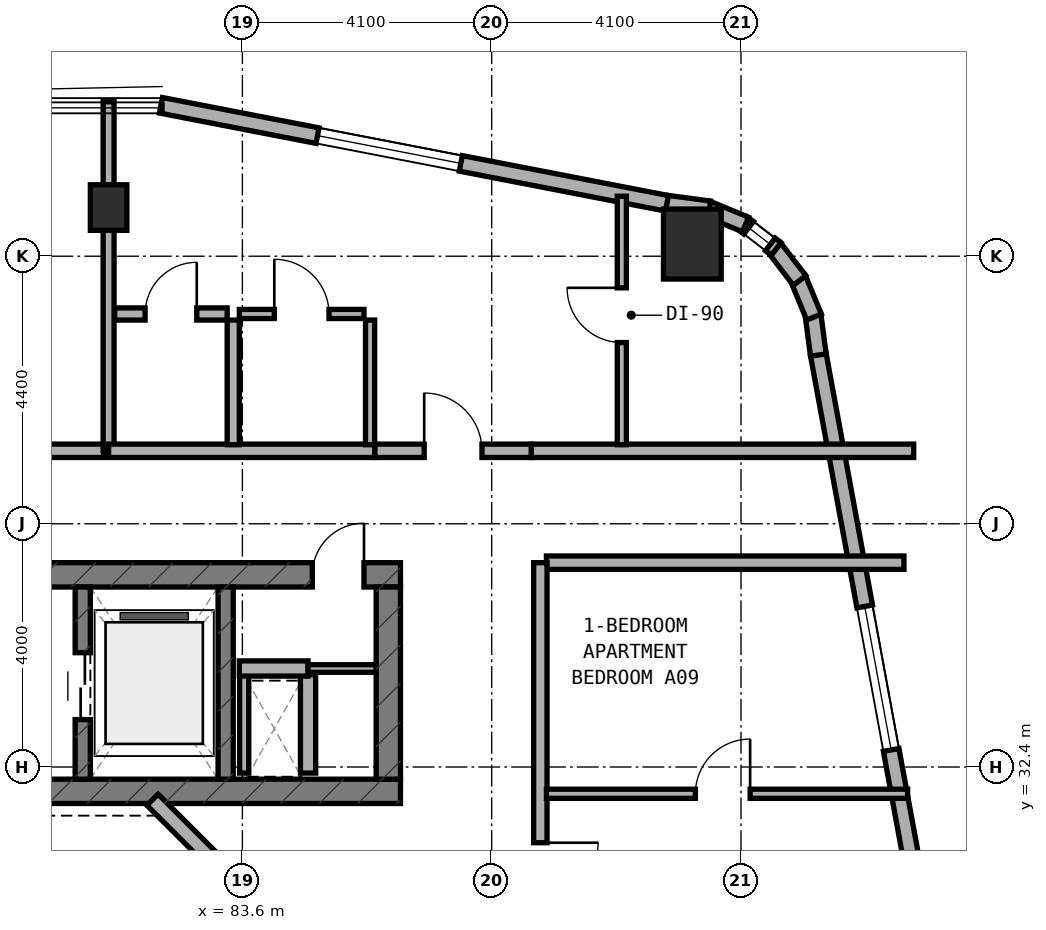
"""IFC4 building model, lengths in metres.
Left out: names, types, materials, properties, quantities, classifications, styles, units other than length and angle.
Written with IfcOpenShell. Run it as: python <this file> out.ifc"""

import sys

from ifc_helpers import new_model, si_unit, direction, frame, frame_2d, origin, origin_2d, place, context, subcontext, project, spatial, rectangle, extrude, element, fill, save


model = new_model("IFC4")
c1 = context("Model", 3, precision=1e-05, world=origin(), true_north=direction((0.0, 1.0)))
c2 = subcontext(c1, "Body", "Model", "MODEL_VIEW")
j1 = project(units=[si_unit("LENGTHUNIT", "METRE"), si_unit("PLANEANGLEUNIT", "RADIAN")], contexts=[c1])
p1 = place(None, origin())
s1 = spatial("IfcSite", under=j1, at=p1, CompositionType="ELEMENT")
p2 = place(p1, origin())
s2 = spatial("IfcBuilding", under=s1, at=p2, CompositionType="ELEMENT")
p3 = place(p2, frame((0.0, 0.0, 98.5)))
s3 = spatial("IfcBuildingStorey", under=s2, at=p3, CompositionType="ELEMENT", Elevation=98.5)
p4 = place(p3, frame((68.0, 32.0, 0.0), z_axis=(0.0, 0.0, 1.0), x_axis=(1.0, 0.0, 0.0)))
e1 = element("IfcWall", 1, at=p4, inside=s3, PredefinedType="SHEAR", context=c2, shape_type="SweptSolid", body=[
    extrude(rectangle(XDim=18.2, YDim=0.4, at=frame_2d((9.1, 0.0))), origin(), (0.0, 0.0, 1.0), 3.5),
])
p5 = place(p3, frame((68.0, 35.56, 0.0), z_axis=(0.0, 0.0, 1.0), x_axis=(1.0, 0.0, 0.0)))
e2 = element("IfcWall", 2, at=p5, inside=s3, PredefinedType="SHEAR", context=c2, shape_type="SweptSolid", body=[
    extrude(rectangle(XDim=18.2, YDim=0.4, at=frame_2d((9.1, 0.0))), origin(), (0.0, 0.0, 1.0), 3.5),
])
p6 = place(p5, frame((9.15, 0.0, 0.0)))
e3 = element("IfcOpeningElement", 3, at=p6, cuts=e2, PredefinedType="OPENING", context=c2, shape_type="SweptSolid", body=[
    extrude(rectangle(XDim=1.2, YDim=2.15, at=frame_2d((0.6, 1.075))), frame((0.0, 0.21, 0.0), z_axis=(0.0, -1.0, 0.0), x_axis=(1.0, 0.0, 0.0)), (0.0, 0.0, 1.0), 0.42),
])
p7 = place(p5, frame((16.75, 0.0, 0.0)))
e4 = element("IfcOpeningElement", 4, at=p7, cuts=e2, PredefinedType="OPENING", context=c2, shape_type="SweptSolid", body=[
    extrude(rectangle(XDim=0.85, YDim=2.1, at=frame_2d((0.425, 1.05))), frame((0.0, 0.21, 0.0), z_axis=(0.0, -1.0, 0.0), x_axis=(1.0, 0.0, 0.0)), (0.0, 0.0, 1.0), 0.42),
])
p8 = place(p3, frame((86.0, 32.2, 0.0), z_axis=(0.0, 0.0, 1.0), x_axis=(0.0, 1.0, 0.0)))
e5 = element("IfcWall", 5, at=p8, inside=s3, PredefinedType="SHEAR", context=c2, shape_type="SweptSolid", body=[
    extrude(rectangle(XDim=3.16, YDim=0.4, at=frame_2d((1.58, 0.0))), origin(), (0.0, 0.0, 1.0), 3.5),
])
p9 = place(p3, frame((80.975, 32.2, 0.0), z_axis=(0.0, 0.0, 1.0), x_axis=(0.0, 1.0, 0.0)))
e6 = element("IfcWall", 6, at=p9, inside=s3, PredefinedType="STANDARD", context=c2, shape_type="SweptSolid", body=[
    extrude(rectangle(XDim=3.16, YDim=0.25, at=frame_2d((1.58, 0.0))), origin(), (0.0, 0.0, 1.0), 3.25),
])
p10 = place(p9, frame((0.98, 0.0, 0.0)))
e7 = element("IfcOpeningElement", 7, at=p10, cuts=e6, PredefinedType="OPENING", context=c2, shape_type="SweptSolid", body=[
    extrude(rectangle(XDim=1.1, YDim=2.15, at=frame_2d((0.55, 1.075))), frame((0.0, 0.135, 0.0), z_axis=(0.0, -1.0, 0.0), x_axis=(1.0, 0.0, 0.0)), (0.0, 0.0, 1.0), 0.27),
])
p11 = place(p3, frame((83.325, 32.2, 0.0), z_axis=(0.0, 0.0, 1.0), x_axis=(0.0, 1.0, 0.0)))
e8 = element("IfcWall", 8, at=p11, inside=s3, PredefinedType="STANDARD", context=c2, shape_type="SweptSolid", body=[
    extrude(rectangle(XDim=3.16, YDim=0.25, at=frame_2d((1.58, 0.0))), origin(), (0.0, 0.0, 1.0), 3.25),
])
p12 = place(p3, frame((81.4, 41.6, 0.0), z_axis=(0.0, 0.0, 1.0), x_axis=(1.0, 0.0, 0.0)))
e9 = element("IfcColumn", 9, at=p12, inside=s3, PredefinedType="COLUMN", context=c2, shape_type="SweptSolid", body=[
    extrude(rectangle(XDim=0.6, YDim=0.75, at=origin_2d()), origin(), (0.0, 0.0, 1.0), 3.5),
])
p13 = place(p3, frame((91.0, 41.0, 0.0), z_axis=(0.0, 0.0, 1.0), x_axis=(1.0, 0.0, 0.0)))
e10 = element("IfcColumn", 10, at=p13, inside=s3, PredefinedType="COLUMN", context=c2, shape_type="SweptSolid", body=[
    extrude(rectangle(XDim=0.95, YDim=1.15, at=origin_2d()), origin(), (0.0, 0.0, 1.0), 3.5),
])
p14 = place(p3, frame((94.682, 30.442, 0.0), z_axis=(0.0, 0.0, 1.0), x_axis=(-0.181209963057, 0.983444431215, 0.0)))
e11 = element("IfcWall", 11, at=p14, inside=s3, PredefinedType="STANDARD", context=c2, shape_type="SweptSolid", body=[
    extrude(rectangle(XDim=8.889, YDim=0.26, at=frame_2d((4.445, 0.0))), origin(), (0.0, 0.0, 1.0), 3.25),
])
p15 = place(p14, frame((2.276, 0.0, 0.8)))
e12 = element("IfcOpeningElement", 12, at=p15, cuts=e11, PredefinedType="OPENING", context=c2, shape_type="SweptSolid", body=[
    extrude(rectangle(XDim=2.4, YDim=1.6, at=frame_2d((1.2, 0.8))), frame((0.0, 0.14, 0.0), z_axis=(0.0, -1.0, 0.0), x_axis=(1.0, 0.0, 0.0)), (0.0, 0.0, 1.0), 0.28),
])
p16 = place(p3, frame((93.072, 39.175, 0.0), z_axis=(0.0, 0.0, 1.0), x_axis=(-0.131667498923, 0.991293937098, 0.0)))
e13 = element("IfcWall", 13, at=p16, inside=s3, PredefinedType="STANDARD", context=c2, shape_type="SweptSolid", body=[
    extrude(rectangle(XDim=0.677, YDim=0.26, at=frame_2d((0.338, 0.0))), origin(), (0.0, 0.0, 1.0), 3.25),
])
p17 = place(p3, frame((93.001, 39.8, 0.0), z_axis=(0.0, 0.0, 1.0), x_axis=(-0.381988976935, 0.924166879681, 0.0)))
e14 = element("IfcWall", 14, at=p17, inside=s3, PredefinedType="STANDARD", context=c2, shape_type="SweptSolid", body=[
    extrude(rectangle(XDim=0.693, YDim=0.26, at=frame_2d((0.347, 0.0))), origin(), (0.0, 0.0, 1.0), 3.25),
])
p18 = place(p3, frame((92.764, 40.401, 0.0), z_axis=(0.0, 0.0, 1.0), x_axis=(-0.609472651958, 0.792807092876, 0.0)))
e15 = element("IfcWall", 15, at=p18, inside=s3, PredefinedType="STANDARD", context=c2, shape_type="SweptSolid", body=[
    extrude(rectangle(XDim=0.694, YDim=0.26, at=frame_2d((0.347, 0.0))), origin(), (0.0, 0.0, 1.0), 3.25),
])
p19 = place(p3, frame((92.379, 40.92, 0.0), z_axis=(0.0, 0.0, 1.0), x_axis=(-0.792506234191, 0.609863811657, 0.0)))
e16 = element("IfcWall", 16, at=p19, inside=s3, PredefinedType="STANDARD", context=c2, shape_type="SweptSolid", body=[
    extrude(rectangle(XDim=0.694, YDim=0.26, at=frame_2d((0.347, 0.0))), origin(), (0.0, 0.0, 1.0), 3.25),
])
p20 = place(p19, frame((0.122, 0.0, 0.85)))
e17 = element("IfcOpeningElement", 17, at=p20, cuts=e16, PredefinedType="OPENING", context=c2, shape_type="SweptSolid", body=[
    extrude(rectangle(XDim=0.45, YDim=1.5, at=frame_2d((0.225, 0.75))), frame((0.0, 0.14, 0.0), z_axis=(0.0, -1.0, 0.0), x_axis=(1.0, 0.0, 0.0)), (0.0, 0.0, 1.0), 0.28),
])
p21 = place(p3, frame((91.873, 41.322, 0.0), z_axis=(0.0, 0.0, 1.0), x_axis=(-0.92421822618, 0.381864727877, 0.0)))
e18 = element("IfcWall", 18, at=p21, inside=s3, PredefinedType="STANDARD", context=c2, shape_type="SweptSolid", body=[
    extrude(rectangle(XDim=0.694, YDim=0.26, at=frame_2d((0.347, 0.0))), origin(), (0.0, 0.0, 1.0), 3.25),
])
p22 = place(p3, frame((91.281, 41.579, 0.0), z_axis=(0.0, 0.0, 1.0), x_axis=(-0.991433279471, 0.130614135366, 0.0)))
e19 = element("IfcWall", 19, at=p22, inside=s3, PredefinedType="STANDARD", context=c2, shape_type="SweptSolid", body=[
    extrude(rectangle(XDim=0.712, YDim=0.26, at=frame_2d((0.356, 0.0))), origin(), (0.0, 0.0, 1.0), 3.25),
])
p23 = place(p3, frame((90.583, 41.67, 0.0), z_axis=(0.0, 0.0, 1.0), x_axis=(-0.981750199588, 0.190175039396, 0.0)))
e20 = element("IfcWall", 20, at=p23, inside=s3, PredefinedType="STANDARD", context=c2, shape_type="SweptSolid", body=[
    extrude(rectangle(XDim=8.477, YDim=0.26, at=frame_2d((4.238, 0.0))), origin(), (0.0, 0.0, 1.0), 3.25),
])
p24 = place(p23, frame((3.454, 0.0, 0.8)))
e21 = element("IfcOpeningElement", 21, at=p24, cuts=e20, PredefinedType="OPENING", context=c2, shape_type="SweptSolid", body=[
    extrude(rectangle(XDim=2.4, YDim=1.6, at=frame_2d((1.2, 0.8))), frame((0.0, 0.14, 0.0), z_axis=(0.0, -1.0, 0.0), x_axis=(1.0, 0.0, 0.0)), (0.0, 0.0, 1.0), 0.28),
])
p25 = place(p3, frame((83.756, 30.228, 0.0), z_axis=(0.0, 0.0, 1.0), x_axis=(-0.707106781187, 0.707106781187, 0.0)))
e22 = element("IfcWall", 22, at=p25, inside=s3, PredefinedType="STANDARD", context=c2, shape_type="SweptSolid", body=[
    extrude(rectangle(XDim=2.311, YDim=0.26, at=frame_2d((1.155, 0.0))), origin(), (0.0, 0.0, 1.0), 3.25),
])
p26 = place(p3, frame((83.63, 32.3, 0.0), z_axis=(0.0, 0.0, 1.0), x_axis=(0.0, 1.0, 0.0)))
e23 = element("IfcWall", 23, at=p26, inside=s3, PredefinedType="PARTITIONING", context=c2, shape_type="SweptSolid", body=[
    extrude(rectangle(XDim=1.62, YDim=0.15, at=frame_2d((0.81, 0.0))), origin(), (0.0, 0.0, 1.0), 2.825),
])
p27 = place(p3, frame((84.68, 32.3, 0.0), z_axis=(0.0, 0.0, 1.0), x_axis=(0.0, 1.0, 0.0)))
e24 = element("IfcWall", 24, at=p27, inside=s3, PredefinedType="SOLIDWALL", context=c2, shape_type="SweptSolid", body=[
    extrude(rectangle(XDim=1.62, YDim=0.25, at=frame_2d((0.81, 0.0))), origin(), (0.0, 0.0, 1.0), 3.22),
])
p28 = place(p3, frame((83.55, 34.02, 0.0), z_axis=(0.0, 0.0, 1.0), x_axis=(1.0, 0.0, 0.0)))
e25 = element("IfcWall", 25, at=p28, inside=s3, PredefinedType="SOLIDWALL", context=c2, shape_type="SweptSolid", body=[
    extrude(rectangle(XDim=1.13, YDim=0.25, at=frame_2d((0.565, 0.0))), origin(), (0.0, 0.0, 1.0), 3.22),
])
p29 = place(p3, frame((84.68, 34.02, 0.0), z_axis=(0.0, 0.0, 1.0), x_axis=(1.0, 0.0, 0.0)))
e26 = element("IfcWall", 26, at=p29, inside=s3, PredefinedType="PARTITIONING", context=c2, shape_type="SweptSolid", body=[
    extrude(rectangle(XDim=1.12, YDim=0.125, at=frame_2d((0.56, 0.0))), origin(), (0.0, 0.0, 1.0), 3.22),
])
p30 = place(p3, frame((76.98, 37.6, 0.0), z_axis=(0.0, 0.0, 1.0), x_axis=(1.0, 0.0, 0.0)))
e27 = element("IfcWall", 27, at=p30, inside=s3, PredefinedType="SOLIDWALL", context=c2, shape_type="SweptSolid", body=[
    extrude(rectangle(XDim=4.34, YDim=0.22, at=frame_2d((2.17, 0.0))), origin(), (0.0, 0.0, 1.0), 2.825),
])
p31 = place(p30, frame((1.695, 0.0, 0.0)))
e28 = element("IfcOpeningElement", 28, at=p31, cuts=e27, PredefinedType="OPENING", context=c2, shape_type="SweptSolid", body=[
    extrude(rectangle(XDim=0.95, YDim=2.1, at=frame_2d((0.475, 1.05))), frame((0.0, 0.12, 0.0), z_axis=(0.0, -1.0, 0.0), x_axis=(1.0, 0.0, 0.0)), (0.0, 0.0, 1.0), 0.24),
])
p32 = place(p3, frame((81.4, 37.6, 0.0), z_axis=(0.0, 0.0, 1.0), x_axis=(0.0, 1.0, 0.0)))
e29 = element("IfcWall", 29, at=p32, inside=s3, PredefinedType="SOLIDWALL", context=c2, shape_type="SweptSolid", body=[
    extrude(rectangle(XDim=5.74, YDim=0.18, at=frame_2d((2.87, 0.0))), origin(), (0.0, 0.0, 1.0), 2.825),
])
p33 = place(p3, frame((81.4, 37.6, 0.0), z_axis=(0.0, 0.0, 1.0), x_axis=(1.0, 0.0, 0.0)))
e30 = element("IfcWall", 30, at=p33, inside=s3, PredefinedType="SOLIDWALL", context=c2, shape_type="SweptSolid", body=[
    extrude(rectangle(XDim=4.38, YDim=0.22, at=frame_2d((2.19, 0.0))), origin(), (0.0, 0.0, 1.0), 2.825),
])
p34 = place(p3, frame((88.35, 37.6, 0.0), z_axis=(0.0, 0.0, 1.0), x_axis=(1.0, 0.0, 0.0)))
e31 = element("IfcWall", 31, at=p34, inside=s3, PredefinedType="SOLIDWALL", context=c2, shape_type="SweptSolid", body=[
    extrude(rectangle(XDim=6.29, YDim=0.22, at=frame_2d((3.145, 0.0))), origin(), (0.0, 0.0, 1.0), 2.945),
])
p35 = place(p3, frame((85.78, 37.6, 0.0), z_axis=(0.0, 0.0, 1.0), x_axis=(1.0, 0.0, 0.0)))
e32 = element("IfcWall", 32, at=p35, inside=s3, PredefinedType="SOLIDWALL", context=c2, shape_type="SweptSolid", body=[
    extrude(rectangle(XDim=2.57, YDim=0.22, at=frame_2d((1.285, 0.0))), origin(), (0.0, 0.0, 1.0), 3.22),
])
p36 = place(p35, frame((0.81, 0.0, 0.0)))
e33 = element("IfcOpeningElement", 33, at=p36, cuts=e32, PredefinedType="OPENING", context=c2, shape_type="SweptSolid", body=[
    extrude(rectangle(XDim=0.95, YDim=2.1, at=frame_2d((0.475, 1.05))), frame((0.0, 0.12, 0.0), z_axis=(0.0, -1.0, 0.0), x_axis=(1.0, 0.0, 0.0)), (0.0, 0.0, 1.0), 0.24),
])
p37 = place(p3, frame((89.84, 37.7, 0.0), z_axis=(0.0, 0.0, 1.0), x_axis=(0.0, 1.0, 0.0)))
e34 = element("IfcWall", 34, at=p37, inside=s3, PredefinedType="PARTITIONING", context=c2, shape_type="SweptSolid", body=[
    extrude(rectangle(XDim=4.086, YDim=0.15, at=frame_2d((2.043, 0.0))), origin(), (0.0, 0.0, 1.0), 2.945),
])
p38 = place(p37, frame((1.68, 0.0, 0.0)))
e35 = element("IfcOpeningElement", 35, at=p38, cuts=e34, PredefinedType="OPENING", context=c2, shape_type="SweptSolid", body=[
    extrude(rectangle(XDim=0.9, YDim=2.1, at=frame_2d((0.45, 1.05))), frame((0.0, 0.085, 0.0), z_axis=(0.0, -1.0, 0.0), x_axis=(1.0, 0.0, 0.0)), (0.0, 0.0, 1.0), 0.17),
])
p39 = place(p3, frame((83.45, 37.7, 0.0), z_axis=(0.0, 0.0, 1.0), x_axis=(0.0, 1.0, 0.0)))
e36 = element("IfcWall", 36, at=p39, inside=s3, PredefinedType="PLUMBINGWALL", context=c2, shape_type="SweptSolid", body=[
    extrude(rectangle(XDim=2.05, YDim=0.2, at=frame_2d((1.025, 0.0))), origin(), (0.0, 0.0, 1.0), 3.22),
])
p40 = place(p3, frame((85.7, 37.7, 0.0), z_axis=(0.0, 0.0, 1.0), x_axis=(0.0, 1.0, 0.0)))
e37 = element("IfcWall", 37, at=p40, inside=s3, PredefinedType="PARTITIONING", context=c2, shape_type="SweptSolid", body=[
    extrude(rectangle(XDim=2.05, YDim=0.15, at=frame_2d((1.025, 0.0))), origin(), (0.0, 0.0, 1.0), 3.22),
])
p41 = place(p3, frame((81.5, 39.85, 0.0), z_axis=(0.0, 0.0, 1.0), x_axis=(1.0, 0.0, 0.0)))
e38 = element("IfcWall", 38, at=p41, inside=s3, PredefinedType="PLUMBINGWALL", context=c2, shape_type="SweptSolid", body=[
    extrude(rectangle(XDim=1.85, YDim=0.2, at=frame_2d((0.925, 0.0))), origin(), (0.0, 0.0, 1.0), 2.825),
])
p42 = place(p41, frame((0.5, 0.0, 0.0)))
e39 = element("IfcOpeningElement", 39, at=p42, cuts=e38, PredefinedType="OPENING", context=c2, shape_type="SweptSolid", body=[
    extrude(rectangle(XDim=0.85, YDim=2.1, at=frame_2d((0.425, 1.05))), frame((0.0, 0.11, 0.0), z_axis=(0.0, -1.0, 0.0), x_axis=(1.0, 0.0, 0.0)), (0.0, 0.0, 1.0), 0.22),
])
p43 = place(p3, frame((83.55, 39.85, 0.0), z_axis=(0.0, 0.0, 1.0), x_axis=(1.0, 0.0, 0.0)))
e40 = element("IfcWall", 40, at=p43, inside=s3, PredefinedType="PARTITIONING", context=c2, shape_type="SweptSolid", body=[
    extrude(rectangle(XDim=2.05, YDim=0.15, at=frame_2d((1.025, 0.0))), origin(), (0.0, 0.0, 1.0), 3.22),
])
p44 = place(p43, frame((0.575, 0.0, 0.0)))
e41 = element("IfcOpeningElement", 41, at=p44, cuts=e40, PredefinedType="OPENING", context=c2, shape_type="SweptSolid", body=[
    extrude(rectangle(XDim=0.9, YDim=2.1, at=frame_2d((0.45, 1.05))), frame((0.0, 0.085, 0.0), z_axis=(0.0, -1.0, 0.0), x_axis=(1.0, 0.0, 0.0)), (0.0, 0.0, 1.0), 0.17),
])
p45 = place(p3, frame((88.6, 35.76, 0.0), z_axis=(0.0, 0.0, 1.0), x_axis=(1.0, 0.0, 0.0)))
e42 = element("IfcWall", 42, at=p45, inside=s3, PredefinedType="SOLIDWALL", context=c2, shape_type="SweptSolid", body=[
    extrude(rectangle(XDim=5.88, YDim=0.22, at=frame_2d((2.94, 0.0))), origin(), (0.0, 0.0, 1.0), 2.945),
])
p46 = place(p3, frame((88.5, 29.4, 0.0), z_axis=(0.0, 0.0, 1.0), x_axis=(0.0, 1.0, 0.0)))
e43 = element("IfcWall", 43, at=p46, inside=s3, PredefinedType="SOLIDWALL", context=c2, shape_type="SweptSolid", body=[
    extrude(rectangle(XDim=6.36, YDim=0.22, at=frame_2d((3.18, 0.0))), origin(), (0.0, 0.0, 1.0), 3.22),
])
p47 = place(p46, frame((0.805, 0.0, 0.0)))
e44 = element("IfcOpeningElement", 44, at=p47, cuts=e43, PredefinedType="OPENING", context=c2, shape_type="SweptSolid", body=[
    extrude(rectangle(XDim=0.95, YDim=2.1, at=frame_2d((0.475, 1.05))), frame((0.0, 0.12, 0.0), z_axis=(0.0, -1.0, 0.0), x_axis=(1.0, 0.0, 0.0)), (0.0, 0.0, 1.0), 0.24),
])
p48 = place(p3, frame((88.6, 31.96, 0.0), z_axis=(0.0, 0.0, 1.0), x_axis=(1.0, 0.0, 0.0)))
e45 = element("IfcWall", 45, at=p48, inside=s3, PredefinedType="PARTITIONING", context=c2, shape_type="SweptSolid", body=[
    extrude(rectangle(XDim=5.94, YDim=0.15, at=frame_2d((2.97, 0.0))), origin(), (0.0, 0.0, 1.0), 2.945),
])
p49 = place(p48, frame((2.45, 0.0, 0.0)))
e46 = element("IfcOpeningElement", 46, at=p49, cuts=e45, PredefinedType="OPENING", context=c2, shape_type="SweptSolid", body=[
    extrude(rectangle(XDim=0.9, YDim=2.1, at=frame_2d((0.45, 1.05))), frame((0.0, 0.085, 0.0), z_axis=(0.0, -1.0, 0.0), x_axis=(1.0, 0.0, 0.0)), (0.0, 0.0, 1.0), 0.17),
])
p50 = place(p15, origin())
e47 = element("IfcWindow", 47, at=p50, inside=s3, PartitioningType="SINGLE_PANEL", PredefinedType="WINDOW", context=c2, shape_type="SweptSolid", body=[
    extrude(rectangle(XDim=2.4, YDim=1.6, at=frame_2d((1.2, 0.8))), frame((0.0, 0.03, 0.0), z_axis=(0.0, -1.0, 0.0), x_axis=(1.0, 0.0, 0.0)), (0.0, 0.0, 1.0), 0.06),
])
fill(e12, e47)
p51 = place(p24, origin())
e48 = element("IfcWindow", 48, at=p51, inside=s3, PartitioningType="SINGLE_PANEL", PredefinedType="WINDOW", context=c2, shape_type="SweptSolid", body=[
    extrude(rectangle(XDim=2.4, YDim=1.6, at=frame_2d((1.2, 0.8))), frame((0.0, 0.03, 0.0), z_axis=(0.0, -1.0, 0.0), x_axis=(1.0, 0.0, 0.0)), (0.0, 0.0, 1.0), 0.06),
])
fill(e21, e48)
p52 = place(p20, origin())
e49 = element("IfcWindow", 49, at=p52, inside=s3, PartitioningType="SINGLE_PANEL", PredefinedType="WINDOW", context=c2, shape_type="SweptSolid", body=[
    extrude(rectangle(XDim=0.45, YDim=1.5, at=frame_2d((0.225, 0.75))), frame((0.0, 0.03, 0.0), z_axis=(0.0, -1.0, 0.0), x_axis=(1.0, 0.0, 0.0)), (0.0, 0.0, 1.0), 0.06),
])
fill(e17, e49)
p53 = place(p10, origin())
e50 = element("IfcDoor", 50, at=p53, inside=s3, OperationType="DOUBLE_DOOR_SLIDING", PredefinedType="DOOR", context=c2, shape_type="SweptSolid", body=[
    extrude(rectangle(XDim=1.1, YDim=2.15, at=frame_2d((0.55, 1.075))), frame((0.0, 0.025, 0.0), z_axis=(0.0, -1.0, 0.0), x_axis=(1.0, 0.0, 0.0)), (0.0, 0.0, 1.0), 0.05),
])
fill(e7, e50)
p54 = place(p7, origin())
e51 = element("IfcDoor", 51, at=p54, inside=s3, OperationType="SINGLE_SWING_RIGHT", PredefinedType="DOOR", context=c2, shape_type="SweptSolid", body=[
    extrude(rectangle(XDim=0.85, YDim=2.1, at=frame_2d((0.425, 1.05))), frame((0.0, 0.025, 0.0), z_axis=(0.0, -1.0, 0.0), x_axis=(1.0, 0.0, 0.0)), (0.0, 0.0, 1.0), 0.05),
])
fill(e4, e51)
p55 = place(p36, origin())
e52 = element("IfcDoor", 52, at=p55, inside=s3, OperationType="SINGLE_SWING_LEFT", PredefinedType="DOOR", context=c2, shape_type="SweptSolid", body=[
    extrude(rectangle(XDim=0.95, YDim=2.1, at=frame_2d((0.475, 1.05))), frame((0.0, 0.025, 0.0), z_axis=(0.0, -1.0, 0.0), x_axis=(1.0, 0.0, 0.0)), (0.0, 0.0, 1.0), 0.05),
])
fill(e33, e52)
p56 = place(p38, origin())
e53 = element("IfcDoor", 53, at=p56, inside=s3, OperationType="SINGLE_SWING_RIGHT", PredefinedType="DOOR", context=c2, shape_type="SweptSolid", body=[
    extrude(rectangle(XDim=0.9, YDim=2.1, at=frame_2d((0.45, 1.05))), frame((0.0, 0.025, 0.0), z_axis=(0.0, -1.0, 0.0), x_axis=(1.0, 0.0, 0.0)), (0.0, 0.0, 1.0), 0.05),
])
fill(e35, e53)
p57 = place(p42, origin())
e54 = element("IfcDoor", 54, at=p57, inside=s3, OperationType="SINGLE_SWING_RIGHT", PredefinedType="DOOR", context=c2, shape_type="SweptSolid", body=[
    extrude(rectangle(XDim=0.85, YDim=2.1, at=frame_2d((0.425, 1.05))), frame((0.0, 0.025, 0.0), z_axis=(0.0, -1.0, 0.0), x_axis=(1.0, 0.0, 0.0)), (0.0, 0.0, 1.0), 0.05),
])
fill(e39, e54)
p58 = place(p44, origin())
e55 = element("IfcDoor", 55, at=p58, inside=s3, OperationType="SINGLE_SWING_LEFT", PredefinedType="DOOR", context=c2, shape_type="SweptSolid", body=[
    extrude(rectangle(XDim=0.9, YDim=2.1, at=frame_2d((0.45, 1.05))), frame((0.0, 0.025, 0.0), z_axis=(0.0, -1.0, 0.0), x_axis=(1.0, 0.0, 0.0)), (0.0, 0.0, 1.0), 0.05),
])
fill(e41, e55)
p59 = place(p47, frame((0.95, 0.0, 0.0), z_axis=(0.0, 0.0, 1.0), x_axis=(-1.0, 0.0, 0.0)))
e56 = element("IfcDoor", 56, at=p59, inside=s3, OperationType="SINGLE_SWING_LEFT", PredefinedType="DOOR", context=c2, shape_type="SweptSolid", body=[
    extrude(rectangle(XDim=0.95, YDim=2.1, at=frame_2d((0.475, 1.05))), frame((0.0, 0.025, 0.0), z_axis=(0.0, -1.0, 0.0), x_axis=(1.0, 0.0, 0.0)), (0.0, 0.0, 1.0), 0.05),
])
fill(e44, e56)
p60 = place(p49, origin())
e57 = element("IfcDoor", 57, at=p60, inside=s3, OperationType="SINGLE_SWING_RIGHT", PredefinedType="DOOR", context=c2, shape_type="SweptSolid", body=[
    extrude(rectangle(XDim=0.9, YDim=2.1, at=frame_2d((0.45, 1.05))), frame((0.0, 0.025, 0.0), z_axis=(0.0, -1.0, 0.0), x_axis=(1.0, 0.0, 0.0)), (0.0, 0.0, 1.0), 0.05),
])
fill(e46, e57)
save(model, sys.argv[1])
